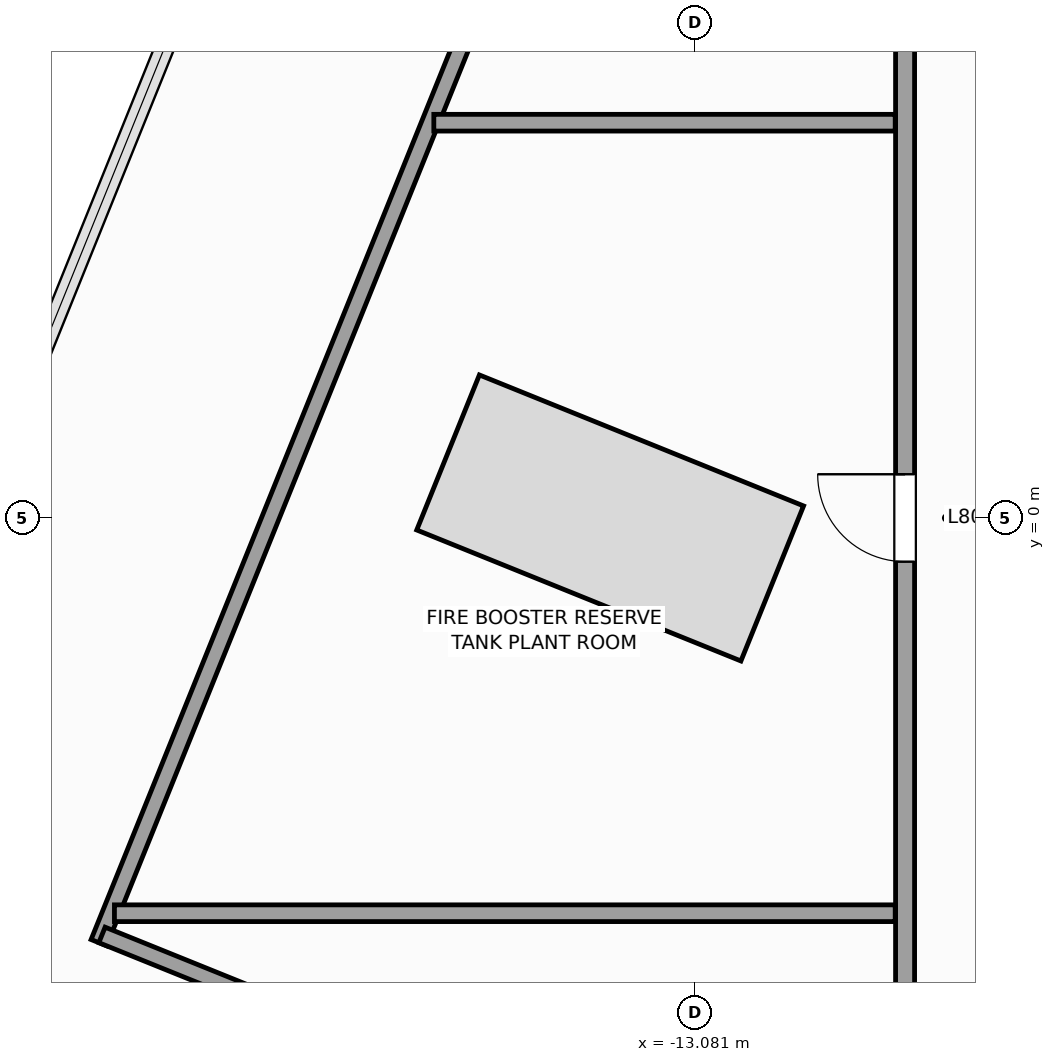
"""IFC4 building model, lengths in metres.
Left out: names, types, materials, properties, quantities, classifications, styles, units other than length and angle.
Written with IfcOpenShell. Run it as: python <this file> out.ifc"""

import sys

from ifc_helpers import new_model, si_unit, direction, frame, frame_2d, origin, place, context, subcontext, project, spatial, rectangle, extrude, source, transform, mapped, element, fill, save


model = new_model("IFC4")
c1 = context("Model", 3, precision=1e-05, world=origin(), true_north=direction((0.0, 1.0)))
c2 = subcontext(c1, "Body", "Model", "MODEL_VIEW")
j1 = project(units=[si_unit("LENGTHUNIT", "METRE"), si_unit("PLANEANGLEUNIT", "RADIAN")], contexts=[c1])
p1 = place(None, origin())
s1 = spatial("IfcSite", under=j1, at=p1, CompositionType="ELEMENT")
p2 = place(p1, origin())
s2 = spatial("IfcBuilding", under=s1, at=p2, CompositionType="ELEMENT")
p3 = place(p2, frame((0.0, 0.0, 325.6)))
s3 = spatial("IfcBuildingStorey", under=s2, at=p3, CompositionType="ELEMENT", Elevation=325.6)
p4 = place(p3, frame((-11.172, 18.556, 0.0), z_axis=(0.0, 0.0, 1.0), x_axis=(-0.374611707018, -0.927181788521, 0.0)))
e1 = element("IfcWall", 1, at=p4, inside=s3, PredefinedType="PARTITIONING", context=c2, shape_type="SweptSolid", body=[
    extrude(rectangle(XDim=26.04, YDim=0.22, at=frame_2d((13.02, 0.0))), origin(), (0.0, 0.0, 1.0), 3.05),
])
p5 = place(p3, frame((-20.886, -5.486, 0.0), z_axis=(0.0, 0.0, 1.0), x_axis=(0.927189216671, -0.374593321469, 0.0)))
e2 = element("IfcWall", 2, at=p5, inside=s3, PredefinedType="PARTITIONING", context=c2, shape_type="SweptSolid", body=[
    extrude(rectangle(XDim=4.4, YDim=0.22, at=frame_2d((2.2, 0.0))), origin(), (0.0, 0.0, 1.0), 3.7),
])
p6 = place(p3, frame((-10.32, -10.22, 0.0), z_axis=(0.0, 0.0, 1.0), x_axis=(0.0, 1.0, 0.0)))
e3 = element("IfcWall", 3, at=p6, inside=s3, PredefinedType="PARTITIONING", context=c2, shape_type="SweptSolid", body=[
    extrude(rectangle(XDim=20.44, YDim=0.25, at=frame_2d((10.22, 0.0))), origin(), (0.0, 0.0, 1.0), 3.7),
])
p7 = place(p6, frame((9.645, 0.0, 0.0)))
e4 = element("IfcOpeningElement", 4, at=p7, cuts=e3, PredefinedType="OPENING", context=c2, shape_type="SweptSolid", body=[
    extrude(rectangle(XDim=1.15, YDim=2.25, at=frame_2d((0.575, 1.125))), frame((0.0, 0.135, 0.0), z_axis=(0.0, -1.0, 0.0), x_axis=(1.0, 0.0, 0.0)), (0.0, 0.0, 1.0), 0.27),
])
p8 = place(p3, frame((-10.45, -5.2, 0.0), z_axis=(0.0, 0.0, 1.0), x_axis=(-1.0, 0.0, 0.0)))
e5 = element("IfcWall", 5, at=p8, inside=s3, PredefinedType="PARTITIONING", context=c2, shape_type="SweptSolid", body=[
    extrude(rectangle(XDim=10.272, YDim=0.22, at=frame_2d((5.136, 0.0))), origin(), (0.0, 0.0, 1.0), 3.7),
])
p9 = place(p3, frame((-10.45, 5.2, 0.0), z_axis=(0.0, 0.0, 1.0), x_axis=(-1.0, 0.0, 0.0)))
e6 = element("IfcWall", 6, at=p9, inside=s3, PredefinedType="PARTITIONING", context=c2, shape_type="SweptSolid", body=[
    extrude(rectangle(XDim=6.07, YDim=0.22, at=frame_2d((3.035, 0.0))), origin(), (0.0, 0.0, 1.0), 3.7),
])
m1 = source(origin(), c2, "Body", "SweptSolid", [
    extrude(rectangle(XDim=1.15, YDim=2.25, at=frame_2d((0.575, 1.125))), frame((0.0, 0.025, 0.0), z_axis=(0.0, -1.0, 0.0), x_axis=(1.0, 0.0, 0.0)), (0.0, 0.0, 1.0), 0.05),
])
p10 = place(p7, origin())
e7 = element("IfcDoor", 7, at=p10, inside=s3, OperationType="SINGLE_SWING_RIGHT", PredefinedType="DOOR", context=c2, shape_type="MappedRepresentation", body=[
    mapped(m1, transform((0.0, 0.0, 0.0), scale=1.0)),
])
fill(e4, e7)
save(model, sys.argv[1])
